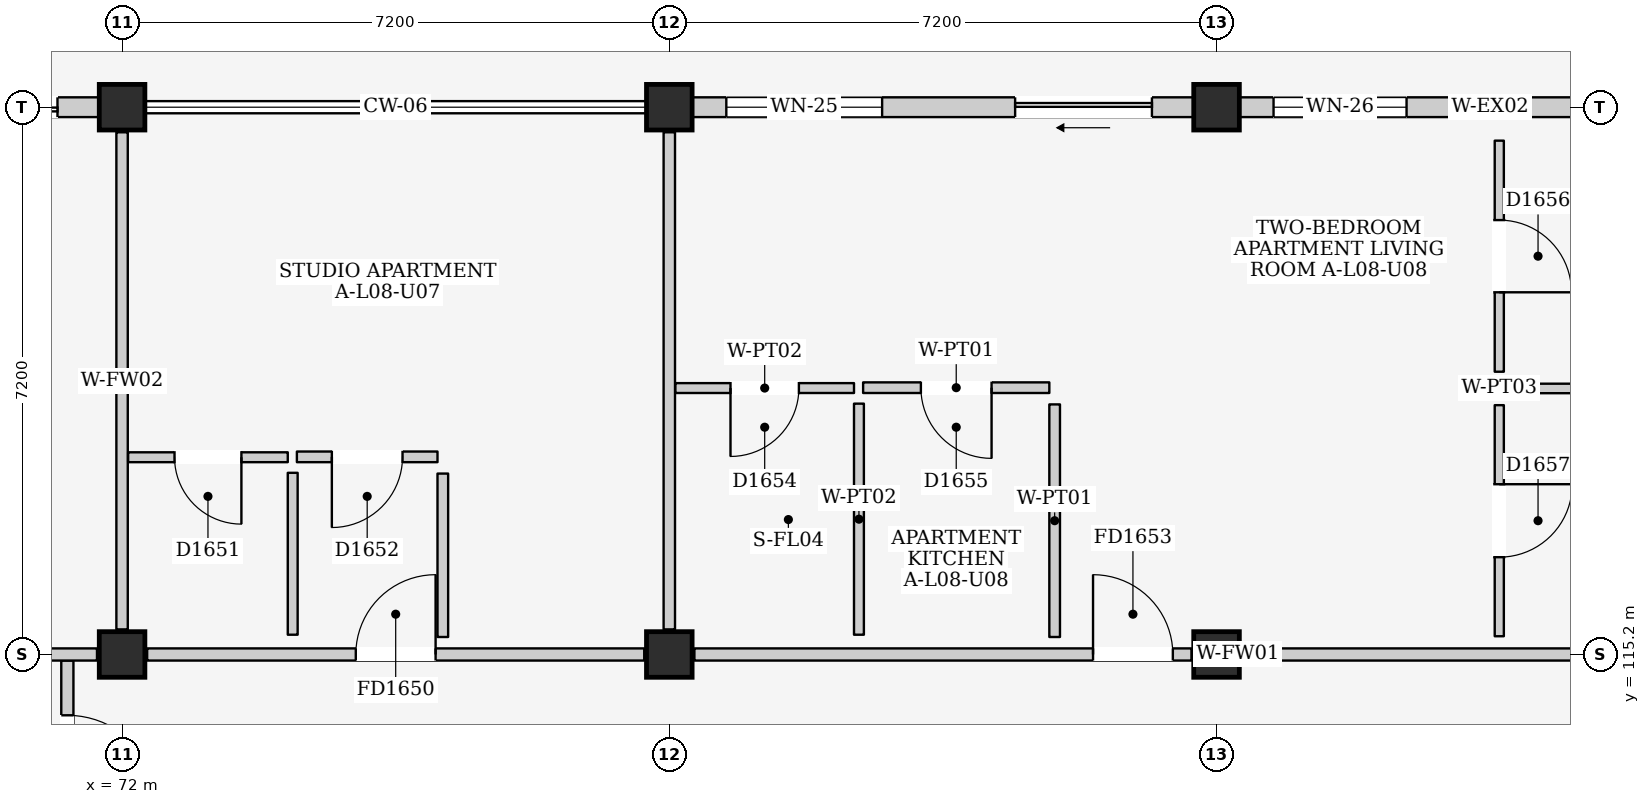
"""IFC4 building model, lengths in metres.
Left out: names, types, materials, properties, quantities, classifications, styles, units other than length and angle.
Written with IfcOpenShell. Run it as: python <this file> out.ifc"""

import sys

from ifc_helpers import new_model, si_unit, direction, frame, frame_2d, origin, origin_2d, place, context, subcontext, project, spatial, rectangle, extrude, element, fill, save


model = new_model("IFC4")
c1 = context("Model", 3, precision=1e-05, world=origin(), true_north=direction((0.0, 1.0)))
c2 = subcontext(c1, "Body", "Model", "MODEL_VIEW")
j1 = project(units=[si_unit("LENGTHUNIT", "METRE"), si_unit("PLANEANGLEUNIT", "RADIAN")], contexts=[c1])
p1 = place(None, origin())
s1 = spatial("IfcSite", under=j1, at=p1, CompositionType="ELEMENT")
p2 = place(p1, origin())
s2 = spatial("IfcBuilding", under=s1, at=p2, CompositionType="ELEMENT")
p3 = place(p2, frame((0.0, 0.0, 28.3)))
s3 = spatial("IfcBuildingStorey", under=s2, at=p3, CompositionType="ELEMENT", Elevation=28.3)
for number, where, z_axis, x_axis in (
    (1, (72.0, 115.2, 0.0), (0.0, 0.0, 1.0), (1.0, 0.0, 0.0)),
    (2, (72.0, 122.4, 0.0), (0.0, 0.0, 1.0), (1.0, 0.0, 0.0)),
    (3, (79.2, 115.2, 0.0), (0.0, 0.0, 1.0), (1.0, 0.0, 0.0)),
    (4, (79.2, 122.4, 0.0), (0.0, 0.0, 1.0), (1.0, 0.0, 0.0)),
    (5, (86.4, 115.2, 0.0), (0.0, 0.0, 1.0), (1.0, 0.0, 0.0)),
    (6, (86.4, 122.4, 0.0), (0.0, 0.0, 1.0), (1.0, 0.0, 0.0)),
):
    element("IfcColumn", number, at=place(p3, frame(where, z_axis=z_axis, x_axis=x_axis)), inside=s3, PredefinedType="COLUMN", context=c2, shape_type="SweptSolid", body=[
        extrude(rectangle(XDim=0.6, YDim=0.6, at=origin_2d()), origin(), (0.0, 0.0, 1.0), 3.2),
    ])
p4 = place(p3, frame((65.1, 122.4, 0.0), z_axis=(0.0, 0.0, 1.0), x_axis=(1.0, 0.0, 0.0)))
e7 = element("IfcWall", 7, at=p4, inside=s3, PredefinedType="ELEMENTEDWALL", context=c2, shape_type="SweptSolid", body=[
    extrude(rectangle(XDim=6.6, YDim=0.26, at=frame_2d((3.3, 0.0))), origin(), (0.0, 0.0, 1.0), 2.485),
])
p5 = place(p4, frame((4.05, 0.0, 0.0)))
e8 = element("IfcOpeningElement", 8, at=p5, cuts=e7, PredefinedType="OPENING", context=c2, shape_type="SweptSolid", body=[
    extrude(rectangle(XDim=2.0, YDim=2.12, at=frame_2d((1.0, 1.06))), frame((0.0, 0.145, 0.0), z_axis=(0.0, -1.0, 0.0), x_axis=(1.0, 0.0, 0.0)), (0.0, 0.0, 1.0), 0.29),
])
p6 = place(p4, frame((0.45, 0.0, 0.9)))
e9 = element("IfcOpeningElement", 9, at=p6, cuts=e7, PredefinedType="OPENING", context=c2, shape_type="SweptSolid", body=[
    extrude(rectangle(XDim=1.85, YDim=1.4, at=frame_2d((0.925, 0.7))), frame((0.0, 0.145, 0.0), z_axis=(0.0, -1.0, 0.0), x_axis=(1.0, 0.0, 0.0)), (0.0, 0.0, 1.0), 0.29),
])
p7 = place(p3, frame((79.5, 122.4, 0.0), z_axis=(0.0, 0.0, 1.0), x_axis=(1.0, 0.0, 0.0)))
e10 = element("IfcWall", 10, at=p7, inside=s3, PredefinedType="ELEMENTEDWALL", context=c2, shape_type="SweptSolid", body=[
    extrude(rectangle(XDim=6.6, YDim=0.26, at=frame_2d((3.3, 0.0))), origin(), (0.0, 0.0, 1.0), 2.485),
])
p8 = place(p7, frame((4.25, 0.0, 0.0)))
e11 = element("IfcOpeningElement", 11, at=p8, cuts=e10, PredefinedType="OPENING", context=c2, shape_type="SweptSolid", body=[
    extrude(rectangle(XDim=1.8, YDim=2.12, at=frame_2d((0.9, 1.06))), frame((0.0, 0.145, 0.0), z_axis=(0.0, -1.0, 0.0), x_axis=(1.0, 0.0, 0.0)), (0.0, 0.0, 1.0), 0.29),
])
p9 = place(p7, frame((0.45, 0.0, 0.775)))
e12 = element("IfcOpeningElement", 12, at=p9, cuts=e10, PredefinedType="OPENING", context=c2, shape_type="SweptSolid", body=[
    extrude(rectangle(XDim=2.05, YDim=1.6, at=frame_2d((1.025, 0.8))), frame((0.0, 0.145, 0.0), z_axis=(0.0, -1.0, 0.0), x_axis=(1.0, 0.0, 0.0)), (0.0, 0.0, 1.0), 0.29),
])
p10 = place(p3, frame((86.7, 122.4, 0.0), z_axis=(0.0, 0.0, 1.0), x_axis=(1.0, 0.0, 0.0)))
e13 = element("IfcWall", 13, at=p10, inside=s3, PredefinedType="ELEMENTEDWALL", context=c2, shape_type="SweptSolid", body=[
    extrude(rectangle(XDim=6.6, YDim=0.26, at=frame_2d((3.3, 0.0))), origin(), (0.0, 0.0, 1.0), 2.485),
])
p11 = place(p10, frame((4.45, 0.0, 0.0)))
e14 = element("IfcOpeningElement", 14, at=p11, cuts=e13, PredefinedType="OPENING", context=c2, shape_type="SweptSolid", body=[
    extrude(rectangle(XDim=1.6, YDim=2.12, at=frame_2d((0.8, 1.06))), frame((0.0, 0.145, 0.0), z_axis=(0.0, -1.0, 0.0), x_axis=(1.0, 0.0, 0.0)), (0.0, 0.0, 1.0), 0.29),
])
p12 = place(p10, frame((0.45, 0.0, 0.825)))
e15 = element("IfcOpeningElement", 15, at=p12, cuts=e13, PredefinedType="OPENING", context=c2, shape_type="SweptSolid", body=[
    extrude(rectangle(XDim=1.75, YDim=1.55, at=frame_2d((0.875, 0.775))), frame((0.0, 0.145, 0.0), z_axis=(0.0, -1.0, 0.0), x_axis=(1.0, 0.0, 0.0)), (0.0, 0.0, 1.0), 0.29),
])
p13 = place(p3, frame((71.28, 110.8, 0.0), z_axis=(0.0, 0.0, 1.0), x_axis=(0.0, 1.0, 0.0)))
e16 = element("IfcWall", 16, at=p13, inside=s3, PredefinedType="PARTITIONING", context=c2, shape_type="SweptSolid", body=[
    extrude(rectangle(XDim=4.32, YDim=0.16, at=frame_2d((2.16, 0.0))), origin(), (0.0, 0.0, 1.0), 2.95),
])
p14 = place(p13, frame((2.4, 0.0, 0.0)))
e17 = element("IfcOpeningElement", 17, at=p14, cuts=e16, PredefinedType="OPENING", context=c2, shape_type="SweptSolid", body=[
    extrude(rectangle(XDim=1.2, YDim=2.2, at=frame_2d((0.6, 1.1))), frame((0.0, 0.095, 0.0), z_axis=(0.0, -1.0, 0.0), x_axis=(1.0, 0.0, 0.0)), (0.0, 0.0, 1.0), 0.19),
])
p15 = place(p3, frame((65.13, 115.2, 0.0), z_axis=(0.0, 0.0, 1.0), x_axis=(1.0, 0.0, 0.0)))
e18 = element("IfcWall", 18, at=p15, inside=s3, PredefinedType="PARTITIONING", context=c2, shape_type="SweptSolid", body=[
    extrude(rectangle(XDim=6.54, YDim=0.16, at=frame_2d((3.27, 0.0))), origin(), (0.0, 0.0, 1.0), 2.285),
])
p16 = place(p15, frame((2.745, 0.0, 0.0)))
e19 = element("IfcOpeningElement", 19, at=p16, cuts=e18, PredefinedType="OPENING", context=c2, shape_type="SweptSolid", body=[
    extrude(rectangle(XDim=1.05, YDim=2.15, at=frame_2d((0.525, 1.075))), frame((0.0, 0.095, 0.0), z_axis=(0.0, -1.0, 0.0), x_axis=(1.0, 0.0, 0.0)), (0.0, 0.0, 1.0), 0.19),
])
p17 = place(p3, frame((72.0, 115.53, 0.0), z_axis=(0.0, 0.0, 1.0), x_axis=(0.0, 1.0, 0.0)))
e20 = element("IfcWall", 20, at=p17, inside=s3, PredefinedType="PARTITIONING", context=c2, shape_type="SweptSolid", body=[
    extrude(rectangle(XDim=6.54, YDim=0.15, at=frame_2d((3.27, 0.0))), origin(), (0.0, 0.0, 1.0), 2.435),
])
p18 = place(p3, frame((72.33, 115.2, 0.0), z_axis=(0.0, 0.0, 1.0), x_axis=(1.0, 0.0, 0.0)))
e21 = element("IfcWall", 21, at=p18, inside=s3, PredefinedType="PARTITIONING", context=c2, shape_type="SweptSolid", body=[
    extrude(rectangle(XDim=6.54, YDim=0.16, at=frame_2d((3.27, 0.0))), origin(), (0.0, 0.0, 1.0), 2.285),
])
p19 = place(p18, frame((2.745, 0.0, 0.0)))
e22 = element("IfcOpeningElement", 22, at=p19, cuts=e21, PredefinedType="OPENING", context=c2, shape_type="SweptSolid", body=[
    extrude(rectangle(XDim=1.05, YDim=2.15, at=frame_2d((0.525, 1.075))), frame((0.0, 0.095, 0.0), z_axis=(0.0, -1.0, 0.0), x_axis=(1.0, 0.0, 0.0)), (0.0, 0.0, 1.0), 0.19),
])
p20 = place(p3, frame((79.2, 115.53, 0.0), z_axis=(0.0, 0.0, 1.0), x_axis=(0.0, 1.0, 0.0)))
e23 = element("IfcWall", 23, at=p20, inside=s3, PredefinedType="PARTITIONING", context=c2, shape_type="SweptSolid", body=[
    extrude(rectangle(XDim=6.54, YDim=0.15, at=frame_2d((3.27, 0.0))), origin(), (0.0, 0.0, 1.0), 2.435),
])
p21 = place(p3, frame((72.08, 117.795, 0.0), z_axis=(0.0, 0.0, 1.0), x_axis=(1.0, 0.0, 0.0)))
e24 = element("IfcWall", 24, at=p21, inside=s3, PredefinedType="PARTITIONING", context=c2, shape_type="SweptSolid", body=[
    extrude(rectangle(XDim=2.1, YDim=0.13, at=frame_2d((1.05, 0.0))), origin(), (0.0, 0.0, 1.0), 2.95),
])
p22 = place(p21, frame((0.61, 0.0, 0.0)))
e25 = element("IfcOpeningElement", 25, at=p22, cuts=e24, PredefinedType="OPENING", context=c2, shape_type="SweptSolid", body=[
    extrude(rectangle(XDim=0.88, YDim=2.1, at=frame_2d((0.44, 1.05))), frame((0.0, 0.08, 0.0), z_axis=(0.0, -1.0, 0.0), x_axis=(1.0, 0.0, 0.0)), (0.0, 0.0, 1.0), 0.16),
])
p23 = place(p3, frame((74.245, 115.46, 0.0), z_axis=(0.0, 0.0, 1.0), x_axis=(0.0, 1.0, 0.0)))
e26 = element("IfcWall", 26, at=p23, inside=s3, PredefinedType="PARTITIONING", context=c2, shape_type="SweptSolid", body=[
    extrude(rectangle(XDim=2.13, YDim=0.13, at=frame_2d((1.065, 0.0))), origin(), (0.0, 0.0, 1.0), 2.95),
])
p24 = place(p3, frame((74.3, 117.8, 0.0), z_axis=(0.0, 0.0, 1.0), x_axis=(1.0, 0.0, 0.0)))
e27 = element("IfcWall", 27, at=p24, inside=s3, PredefinedType="PARTITIONING", context=c2, shape_type="SweptSolid", body=[
    extrude(rectangle(XDim=1.85, YDim=0.14, at=frame_2d((0.925, 0.0))), origin(), (0.0, 0.0, 1.0), 2.95),
])
p25 = place(p24, frame((0.46, 0.0, 0.0)))
e28 = element("IfcOpeningElement", 28, at=p25, cuts=e27, PredefinedType="OPENING", context=c2, shape_type="SweptSolid", body=[
    extrude(rectangle(XDim=0.93, YDim=2.14, at=frame_2d((0.465, 1.07))), frame((0.0, 0.085, 0.0), z_axis=(0.0, -1.0, 0.0), x_axis=(1.0, 0.0, 0.0)), (0.0, 0.0, 1.0), 0.17),
])
p26 = place(p3, frame((76.22, 115.43, 0.0), z_axis=(0.0, 0.0, 1.0), x_axis=(0.0, 1.0, 0.0)))
e29 = element("IfcWall", 29, at=p26, inside=s3, PredefinedType="PARTITIONING", context=c2, shape_type="SweptSolid", body=[
    extrude(rectangle(XDim=2.15, YDim=0.14, at=frame_2d((1.075, 0.0))), origin(), (0.0, 0.0, 1.0), 2.95),
])
p27 = place(p3, frame((79.53, 115.2, 0.0), z_axis=(0.0, 0.0, 1.0), x_axis=(1.0, 0.0, 0.0)))
e30 = element("IfcWall", 30, at=p27, inside=s3, PredefinedType="PARTITIONING", context=c2, shape_type="SweptSolid", body=[
    extrude(rectangle(XDim=6.54, YDim=0.16, at=frame_2d((3.27, 0.0))), origin(), (0.0, 0.0, 1.0), 2.285),
])
p28 = place(p27, frame((5.245, 0.0, 0.0)))
e31 = element("IfcOpeningElement", 31, at=p28, cuts=e30, PredefinedType="OPENING", context=c2, shape_type="SweptSolid", body=[
    extrude(rectangle(XDim=1.05, YDim=2.15, at=frame_2d((0.525, 1.075))), frame((0.0, 0.095, 0.0), z_axis=(0.0, -1.0, 0.0), x_axis=(1.0, 0.0, 0.0)), (0.0, 0.0, 1.0), 0.19),
])
p29 = place(p3, frame((86.73, 115.2, 0.0), z_axis=(0.0, 0.0, 1.0), x_axis=(1.0, 0.0, 0.0)))
e32 = element("IfcWall", 32, at=p29, inside=s3, PredefinedType="PARTITIONING", context=c2, shape_type="SweptSolid", body=[
    extrude(rectangle(XDim=6.54, YDim=0.16, at=frame_2d((3.27, 0.0))), origin(), (0.0, 0.0, 1.0), 2.285),
])
p30 = place(p3, frame((79.28, 118.705, 0.0), z_axis=(0.0, 0.0, 1.0), x_axis=(1.0, 0.0, 0.0)))
e33 = element("IfcWall", 33, at=p30, inside=s3, PredefinedType="PARTITIONING", context=c2, shape_type="SweptSolid", body=[
    extrude(rectangle(XDim=2.35, YDim=0.13, at=frame_2d((1.175, 0.0))), origin(), (0.0, 0.0, 1.0), 2.95),
])
p31 = place(p30, frame((0.725, 0.0, 0.0)))
e34 = element("IfcOpeningElement", 34, at=p31, cuts=e33, PredefinedType="OPENING", context=c2, shape_type="SweptSolid", body=[
    extrude(rectangle(XDim=0.9, YDim=2.1, at=frame_2d((0.45, 1.05))), frame((0.0, 0.08, 0.0), z_axis=(0.0, -1.0, 0.0), x_axis=(1.0, 0.0, 0.0)), (0.0, 0.0, 1.0), 0.16),
])
p32 = place(p3, frame((81.695, 115.46, 0.0), z_axis=(0.0, 0.0, 1.0), x_axis=(0.0, 1.0, 0.0)))
e35 = element("IfcWall", 35, at=p32, inside=s3, PredefinedType="PARTITIONING", context=c2, shape_type="SweptSolid", body=[
    extrude(rectangle(XDim=3.04, YDim=0.13, at=frame_2d((1.52, 0.0))), origin(), (0.0, 0.0, 1.0), 2.95),
])
p33 = place(p3, frame((81.75, 118.71, 0.0), z_axis=(0.0, 0.0, 1.0), x_axis=(1.0, 0.0, 0.0)))
e36 = element("IfcWall", 36, at=p33, inside=s3, PredefinedType="PARTITIONING", context=c2, shape_type="SweptSolid", body=[
    extrude(rectangle(XDim=2.45, YDim=0.14, at=frame_2d((1.225, 0.0))), origin(), (0.0, 0.0, 1.0), 2.95),
])
p34 = place(p33, frame((0.76, 0.0, 0.0)))
e37 = element("IfcOpeningElement", 37, at=p34, cuts=e36, PredefinedType="OPENING", context=c2, shape_type="SweptSolid", body=[
    extrude(rectangle(XDim=0.93, YDim=2.14, at=frame_2d((0.465, 1.07))), frame((0.0, 0.085, 0.0), z_axis=(0.0, -1.0, 0.0), x_axis=(1.0, 0.0, 0.0)), (0.0, 0.0, 1.0), 0.17),
])
p35 = place(p3, frame((84.27, 115.43, 0.0), z_axis=(0.0, 0.0, 1.0), x_axis=(0.0, 1.0, 0.0)))
e38 = element("IfcWall", 38, at=p35, inside=s3, PredefinedType="PARTITIONING", context=c2, shape_type="SweptSolid", body=[
    extrude(rectangle(XDim=3.06, YDim=0.14, at=frame_2d((1.53, 0.0))), origin(), (0.0, 0.0, 1.0), 2.95),
])
p36 = place(p3, frame((90.12, 118.92, 0.0), z_axis=(0.0, 0.0, 1.0), x_axis=(0.0, 1.0, 0.0)))
e39 = element("IfcWall", 39, at=p36, inside=s3, PredefinedType="PARTITIONING", context=c2, shape_type="SweptSolid", body=[
    extrude(rectangle(XDim=3.04, YDim=0.12, at=frame_2d((1.52, 0.0))), origin(), (0.0, 0.0, 1.0), 2.95),
])
p37 = place(p36, frame((1.045, 0.0, 0.0)))
e40 = element("IfcOpeningElement", 40, at=p37, cuts=e39, PredefinedType="OPENING", context=c2, shape_type="SweptSolid", body=[
    extrude(rectangle(XDim=0.95, YDim=2.15, at=frame_2d((0.475, 1.075))), frame((0.0, 0.075, 0.0), z_axis=(0.0, -1.0, 0.0), x_axis=(1.0, 0.0, 0.0)), (0.0, 0.0, 1.0), 0.15),
])
p38 = place(p3, frame((90.32, 118.7, 0.0), z_axis=(0.0, 0.0, 1.0), x_axis=(1.0, 0.0, 0.0)))
e41 = element("IfcWall", 41, at=p38, inside=s3, PredefinedType="PARTITIONING", context=c2, shape_type="SweptSolid", body=[
    extrude(rectangle(XDim=3.06, YDim=0.125, at=frame_2d((1.53, 0.0))), origin(), (0.0, 0.0, 1.0), 2.95),
])
p39 = place(p3, frame((90.12, 115.44, 0.0), z_axis=(0.0, 0.0, 1.0), x_axis=(0.0, 1.0, 0.0)))
e42 = element("IfcWall", 42, at=p39, inside=s3, PredefinedType="PARTITIONING", context=c2, shape_type="SweptSolid", body=[
    extrude(rectangle(XDim=3.04, YDim=0.12, at=frame_2d((1.52, 0.0))), origin(), (0.0, 0.0, 1.0), 2.95),
])
p40 = place(p39, frame((1.04, 0.0, 0.0)))
e43 = element("IfcOpeningElement", 43, at=p40, cuts=e42, PredefinedType="OPENING", context=c2, shape_type="SweptSolid", body=[
    extrude(rectangle(XDim=0.96, YDim=2.15, at=frame_2d((0.48, 1.075))), frame((0.0, 0.075, 0.0), z_axis=(0.0, -1.0, 0.0), x_axis=(1.0, 0.0, 0.0)), (0.0, 0.0, 1.0), 0.15),
])
p41 = place(p5, frame((2.0, 0.0, 0.0), z_axis=(0.0, 0.0, 1.0), x_axis=(-1.0, 0.0, 0.0)))
e44 = element("IfcDoor", 44, at=p41, inside=s3, OperationType="DOUBLE_DOOR_SLIDING", PredefinedType="DOOR", context=c2, shape_type="SweptSolid", body=[
    extrude(rectangle(XDim=2.0, YDim=2.12, at=frame_2d((1.0, 1.06))), frame((0.0, 0.025, 0.0), z_axis=(0.0, -1.0, 0.0), x_axis=(1.0, 0.0, 0.0)), (0.0, 0.0, 1.0), 0.05),
])
fill(e8, e44)
p42 = place(p8, frame((1.8, 0.0, 0.0), z_axis=(0.0, 0.0, 1.0), x_axis=(-1.0, 0.0, 0.0)))
e45 = element("IfcDoor", 45, at=p42, inside=s3, OperationType="SLIDING_TO_LEFT", PredefinedType="DOOR", context=c2, shape_type="SweptSolid", body=[
    extrude(rectangle(XDim=1.8, YDim=2.12, at=frame_2d((0.9, 1.06))), frame((0.0, 0.025, 0.0), z_axis=(0.0, -1.0, 0.0), x_axis=(1.0, 0.0, 0.0)), (0.0, 0.0, 1.0), 0.05),
])
fill(e11, e45)
p43 = place(p9, origin())
e46 = element("IfcWindow", 46, at=p43, inside=s3, PartitioningType="DOUBLE_PANEL_VERTICAL", PredefinedType="WINDOW", context=c2, shape_type="SweptSolid", body=[
    extrude(rectangle(XDim=2.05, YDim=1.6, at=frame_2d((1.025, 0.8))), frame((0.0, 0.03, 0.0), z_axis=(0.0, -1.0, 0.0), x_axis=(1.0, 0.0, 0.0)), (0.0, 0.0, 1.0), 0.06),
])
fill(e12, e46)
p44 = place(p12, origin())
e47 = element("IfcWindow", 47, at=p44, inside=s3, PartitioningType="DOUBLE_PANEL_VERTICAL", PredefinedType="WINDOW", context=c2, shape_type="SweptSolid", body=[
    extrude(rectangle(XDim=1.75, YDim=1.55, at=frame_2d((0.875, 0.775))), frame((0.0, 0.03, 0.0), z_axis=(0.0, -1.0, 0.0), x_axis=(1.0, 0.0, 0.0)), (0.0, 0.0, 1.0), 0.06),
])
fill(e15, e47)
p45 = place(p14, frame((1.2, 0.0, 0.0), z_axis=(0.0, 0.0, 1.0), x_axis=(-1.0, 0.0, 0.0)))
e48 = element("IfcDoor", 48, at=p45, inside=s3, OperationType="SINGLE_SWING_RIGHT", PredefinedType="DOOR", context=c2, shape_type="SweptSolid", body=[
    extrude(rectangle(XDim=1.2, YDim=2.2, at=frame_2d((0.6, 1.1))), frame((0.0, 0.025, 0.0), z_axis=(0.0, -1.0, 0.0), x_axis=(1.0, 0.0, 0.0)), (0.0, 0.0, 1.0), 0.05),
])
fill(e17, e48)
p46 = place(p19, origin())
e49 = element("IfcDoor", 49, at=p46, inside=s3, OperationType="SINGLE_SWING_RIGHT", PredefinedType="DOOR", context=c2, shape_type="SweptSolid", body=[
    extrude(rectangle(XDim=1.05, YDim=2.15, at=frame_2d((0.525, 1.075))), frame((0.0, 0.025, 0.0), z_axis=(0.0, -1.0, 0.0), x_axis=(1.0, 0.0, 0.0)), (0.0, 0.0, 1.0), 0.05),
])
fill(e22, e49)
p47 = place(p22, frame((0.88, 0.0, 0.0), z_axis=(0.0, 0.0, 1.0), x_axis=(-1.0, 0.0, 0.0)))
e50 = element("IfcDoor", 50, at=p47, inside=s3, OperationType="SINGLE_SWING_LEFT", PredefinedType="DOOR", context=c2, shape_type="SweptSolid", body=[
    extrude(rectangle(XDim=0.88, YDim=2.1, at=frame_2d((0.44, 1.05))), frame((0.0, 0.025, 0.0), z_axis=(0.0, -1.0, 0.0), x_axis=(1.0, 0.0, 0.0)), (0.0, 0.0, 1.0), 0.05),
])
fill(e25, e50)
p48 = place(p25, frame((0.93, 0.0, 0.0), z_axis=(0.0, 0.0, 1.0), x_axis=(-1.0, 0.0, 0.0)))
e51 = element("IfcDoor", 51, at=p48, inside=s3, OperationType="SINGLE_SWING_RIGHT", PredefinedType="DOOR", context=c2, shape_type="SweptSolid", body=[
    extrude(rectangle(XDim=0.93, YDim=2.14, at=frame_2d((0.465, 1.07))), frame((0.0, 0.025, 0.0), z_axis=(0.0, -1.0, 0.0), x_axis=(1.0, 0.0, 0.0)), (0.0, 0.0, 1.0), 0.05),
])
fill(e28, e51)
p49 = place(p28, origin())
e52 = element("IfcDoor", 52, at=p49, inside=s3, OperationType="SINGLE_SWING_LEFT", PredefinedType="DOOR", context=c2, shape_type="SweptSolid", body=[
    extrude(rectangle(XDim=1.05, YDim=2.15, at=frame_2d((0.525, 1.075))), frame((0.0, 0.025, 0.0), z_axis=(0.0, -1.0, 0.0), x_axis=(1.0, 0.0, 0.0)), (0.0, 0.0, 1.0), 0.05),
])
fill(e31, e52)
p50 = place(p31, frame((0.9, 0.0, 0.0), z_axis=(0.0, 0.0, 1.0), x_axis=(-1.0, 0.0, 0.0)))
e53 = element("IfcDoor", 53, at=p50, inside=s3, OperationType="SINGLE_SWING_RIGHT", PredefinedType="DOOR", context=c2, shape_type="SweptSolid", body=[
    extrude(rectangle(XDim=0.9, YDim=2.1, at=frame_2d((0.45, 1.05))), frame((0.0, 0.025, 0.0), z_axis=(0.0, -1.0, 0.0), x_axis=(1.0, 0.0, 0.0)), (0.0, 0.0, 1.0), 0.05),
])
fill(e34, e53)
p51 = place(p34, frame((0.93, 0.0, 0.0), z_axis=(0.0, 0.0, 1.0), x_axis=(-1.0, 0.0, 0.0)))
e54 = element("IfcDoor", 54, at=p51, inside=s3, OperationType="SINGLE_SWING_LEFT", PredefinedType="DOOR", context=c2, shape_type="SweptSolid", body=[
    extrude(rectangle(XDim=0.93, YDim=2.14, at=frame_2d((0.465, 1.07))), frame((0.0, 0.025, 0.0), z_axis=(0.0, -1.0, 0.0), x_axis=(1.0, 0.0, 0.0)), (0.0, 0.0, 1.0), 0.05),
])
fill(e37, e54)
p52 = place(p37, frame((0.95, 0.0, 0.0), z_axis=(0.0, 0.0, 1.0), x_axis=(-1.0, 0.0, 0.0)))
e55 = element("IfcDoor", 55, at=p52, inside=s3, OperationType="SINGLE_SWING_RIGHT", PredefinedType="DOOR", context=c2, shape_type="SweptSolid", body=[
    extrude(rectangle(XDim=0.95, YDim=2.15, at=frame_2d((0.475, 1.075))), frame((0.0, 0.025, 0.0), z_axis=(0.0, -1.0, 0.0), x_axis=(1.0, 0.0, 0.0)), (0.0, 0.0, 1.0), 0.05),
])
fill(e40, e55)
p53 = place(p40, frame((0.96, 0.0, 0.0), z_axis=(0.0, 0.0, 1.0), x_axis=(-1.0, 0.0, 0.0)))
e56 = element("IfcDoor", 56, at=p53, inside=s3, OperationType="SINGLE_SWING_LEFT", PredefinedType="DOOR", context=c2, shape_type="SweptSolid", body=[
    extrude(rectangle(XDim=0.96, YDim=2.15, at=frame_2d((0.48, 1.075))), frame((0.0, 0.025, 0.0), z_axis=(0.0, -1.0, 0.0), x_axis=(1.0, 0.0, 0.0)), (0.0, 0.0, 1.0), 0.05),
])
fill(e43, e56)
save(model, sys.argv[1])
